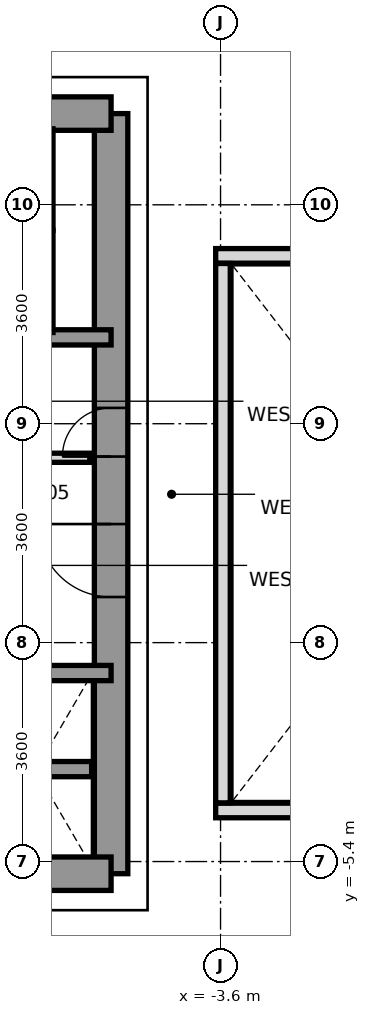
"""IFC4 building model, lengths in metres.
Left out: names, types, materials, properties, quantities, classifications, styles, units other than length and angle.
Written with IfcOpenShell. Run it as: python <this file> out.ifc"""

import sys

from ifc_helpers import new_model, si_unit, direction, frame, frame_2d, origin, place, context, subcontext, project, spatial, rectangle, extrude, source, transform, mapped, element, fill, save


model = new_model("IFC4")
c1 = context("Model", 3, precision=1e-05, world=origin(), true_north=direction((0.0, 1.0)))
c2 = subcontext(c1, "Body", "Model", "MODEL_VIEW")
j1 = project(units=[si_unit("LENGTHUNIT", "METRE"), si_unit("PLANEANGLEUNIT", "RADIAN")], contexts=[c1])
p1 = place(None, origin())
s1 = spatial("IfcSite", under=j1, at=p1, CompositionType="ELEMENT")
p2 = place(p1, origin())
s2 = spatial("IfcBuilding", under=s1, at=p2, CompositionType="ELEMENT")
p3 = place(p2, frame((0.0, 0.0, 74.8)))
s3 = spatial("IfcBuildingStorey", under=s2, at=p3, CompositionType="ELEMENT", Elevation=74.8)
p4 = place(p3, frame((-5.4, -5.6, 0.0), z_axis=(0.0, 0.0, 1.0), x_axis=(0.0, 1.0, 0.0)))
e1 = element("IfcWall", 1, at=p4, inside=s3, PredefinedType="SHEAR", context=c2, shape_type="SweptSolid", body=[
    extrude(rectangle(XDim=12.5, YDim=0.55, at=frame_2d((6.25, 0.0))), origin(), (0.0, 0.0, 1.0), 3.2),
])
p5 = place(p4, frame((4.55, 0.0, 0.0)))
e2 = element("IfcOpeningElement", 2, at=p5, cuts=e1, PredefinedType="OPENING", context=c2, shape_type="SweptSolid", body=[
    extrude(rectangle(XDim=1.2, YDim=2.2, at=frame_2d((0.6, 1.1))), frame((0.0, 0.285, 0.0), z_axis=(0.0, -1.0, 0.0), x_axis=(1.0, 0.0, 0.0)), (0.0, 0.0, 1.0), 0.57),
])
p6 = place(p4, frame((6.86, 0.0, 0.0)))
e3 = element("IfcOpeningElement", 3, at=p6, cuts=e1, PredefinedType="OPENING", context=c2, shape_type="SweptSolid", body=[
    extrude(rectangle(XDim=0.8, YDim=2.1, at=frame_2d((0.4, 1.05))), frame((0.0, 0.285, 0.0), z_axis=(0.0, -1.0, 0.0), x_axis=(1.0, 0.0, 0.0)), (0.0, 0.0, 1.0), 0.57),
])
p7 = place(p3, frame((-11.381, 6.9, 0.0), z_axis=(0.0, 0.0, 1.0), x_axis=(1.0, 0.0, 0.0)))
e4 = element("IfcWall", 4, at=p7, inside=s3, PredefinedType="SHEAR", context=c2, shape_type="SweptSolid", body=[
    extrude(rectangle(XDim=5.981, YDim=0.55, at=frame_2d((2.991, 0.0))), origin(), (0.0, 0.0, 1.0), 3.2),
])
p8 = place(p3, frame((-13.2, -5.6, 0.0), z_axis=(0.0, 0.0, 1.0), x_axis=(1.0, 0.0, 0.0)))
e5 = element("IfcWall", 5, at=p8, inside=s3, PredefinedType="SHEAR", context=c2, shape_type="SweptSolid", body=[
    extrude(rectangle(XDim=7.8, YDim=0.55, at=frame_2d((3.9, 0.0))), origin(), (0.0, 0.0, 1.0), 3.2),
])
p9 = place(p8, frame((3.6, 0.0, 0.0)))
e6 = element("IfcOpeningElement", 6, at=p9, cuts=e5, PredefinedType="OPENING", context=c2, shape_type="SweptSolid", body=[
    extrude(rectangle(XDim=1.2, YDim=2.2, at=frame_2d((0.6, 1.1))), frame((0.0, 0.285, 0.0), z_axis=(0.0, -1.0, 0.0), x_axis=(1.0, 0.0, 0.0)), (0.0, 0.0, 1.0), 0.57),
])
p10 = place(p3, frame((-8.18, 3.22, 0.0), z_axis=(0.0, 0.0, 1.0), x_axis=(1.0, 0.0, 0.0)))
e7 = element("IfcWall", 7, at=p10, inside=s3, PredefinedType="SOLIDWALL", context=c2, shape_type="SweptSolid", body=[
    extrude(rectangle(XDim=2.78, YDim=0.25, at=frame_2d((1.39, 0.0))), origin(), (0.0, 0.0, 1.0), 3.2),
])
p11 = place(p3, frame((-8.48, -2.3, 0.0), z_axis=(0.0, 0.0, 1.0), x_axis=(1.0, 0.0, 0.0)))
e8 = element("IfcWall", 8, at=p11, inside=s3, PredefinedType="SOLIDWALL", context=c2, shape_type="SweptSolid", body=[
    extrude(rectangle(XDim=3.08, YDim=0.25, at=frame_2d((1.54, 0.0))), origin(), (0.0, 0.0, 1.0), 3.2),
])
p12 = place(p3, frame((-7.56, -3.88, 0.0), z_axis=(0.0, 0.0, 1.0), x_axis=(1.0, 0.0, 0.0)))
e9 = element("IfcWall", 9, at=p12, inside=s3, PredefinedType="SOLIDWALL", context=c2, shape_type="SweptSolid", body=[
    extrude(rectangle(XDim=1.84, YDim=0.25, at=frame_2d((0.92, 0.0))), origin(), (0.0, 0.0, 1.0), 3.2),
])
p13 = place(p3, frame((-6.48, 3.3, 0.0), z_axis=(0.0, 0.0, 1.0), x_axis=(0.0, 1.0, 0.0)))
e10 = element("IfcWall", 10, at=p13, inside=s3, PredefinedType="SOLIDWALL", context=c2, shape_type="SweptSolid", body=[
    extrude(rectangle(XDim=1.68, YDim=0.25, at=frame_2d((0.84, 0.0))), origin(), (0.0, 0.0, 1.0), 3.2),
])
p14 = place(p3, frame((-6.48, 4.98, 0.0), z_axis=(0.0, 0.0, 1.0), x_axis=(0.0, 1.0, 0.0)))
e11 = element("IfcWall", 11, at=p14, inside=s3, PredefinedType="SOLIDWALL", context=c2, shape_type="SweptSolid", body=[
    extrude(rectangle(XDim=1.67, YDim=0.25, at=frame_2d((0.835, 0.0))), origin(), (0.0, 0.0, 1.0), 3.2),
])
p15 = place(p3, frame((-8.14, 1.24, 0.0), z_axis=(0.0, 0.0, 1.0), x_axis=(1.0, 0.0, 0.0)))
e12 = element("IfcWall", 12, at=p15, inside=s3, PredefinedType="PARTITIONING", context=c2, shape_type="SweptSolid", body=[
    extrude(rectangle(XDim=2.39, YDim=0.15, at=frame_2d((1.195, 0.0))), origin(), (0.0, 0.0, 1.0), 2.3),
])
for number, where, z_axis, x_axis in (
    (13, (-3.68, -4.56, 0.0), (0.0, 0.0, 1.0), (1.0, 0.0, 0.0)),
    (14, (-3.68, 4.56, 0.0), (0.0, 0.0, 1.0), (1.0, 0.0, 0.0)),
):
    element("IfcWall", number, at=place(p3, frame(where, z_axis=z_axis, x_axis=x_axis)), inside=s3, PredefinedType="PARAPET", context=c2, shape_type="SweptSolid", body=[
        extrude(rectangle(XDim=7.36, YDim=0.24, at=frame_2d((3.68, 0.0))), origin(), (0.0, 0.0, 1.0), 1.15),
    ])
p16 = place(p3, frame((-3.56, -4.435, 0.0), z_axis=(0.0, 0.0, 1.0), x_axis=(0.0, 1.0, 0.0)))
e15 = element("IfcWall", 15, at=p16, inside=s3, PredefinedType="PARAPET", context=c2, shape_type="SweptSolid", body=[
    extrude(rectangle(XDim=8.87, YDim=0.24, at=frame_2d((4.435, 0.0))), origin(), (0.0, 0.0, 1.0), 1.15),
])
m1 = source(origin(), c2, "Body", "SweptSolid", [
    extrude(rectangle(XDim=1.2, YDim=2.2, at=frame_2d((0.6, 1.1))), frame((0.0, 0.025, 0.0), z_axis=(0.0, -1.0, 0.0), x_axis=(1.0, 0.0, 0.0)), (0.0, 0.0, 1.0), 0.05),
])
p17 = place(p5, origin())
e16 = element("IfcDoor", 16, at=p17, inside=s3, OperationType="SINGLE_SWING_RIGHT", PredefinedType="DOOR", context=c2, shape_type="MappedRepresentation", body=[
    mapped(m1, transform((0.0, 0.0, 0.0), x_axis=(1.0, 0.0, 0.0), y_axis=(0.0, 1.0, 0.0), z_axis=(0.0, 0.0, 1.0), scale=1.0)),
])
fill(e2, e16)
m2 = source(origin(), c2, "Body", "SweptSolid", [
    extrude(rectangle(XDim=0.8, YDim=2.1, at=frame_2d((0.4, 1.05))), frame((0.0, 0.025, 0.0), z_axis=(0.0, -1.0, 0.0), x_axis=(1.0, 0.0, 0.0)), (0.0, 0.0, 1.0), 0.05),
])
p18 = place(p6, origin())
e17 = element("IfcDoor", 17, at=p18, inside=s3, OperationType="SINGLE_SWING_LEFT", PredefinedType="DOOR", context=c2, shape_type="MappedRepresentation", body=[
    mapped(m2, transform((0.0, 0.0, 0.0), x_axis=(1.0, 0.0, 0.0), y_axis=(0.0, 1.0, 0.0), z_axis=(0.0, 0.0, 1.0), scale=1.0)),
])
fill(e3, e17)
save(model, sys.argv[1])
